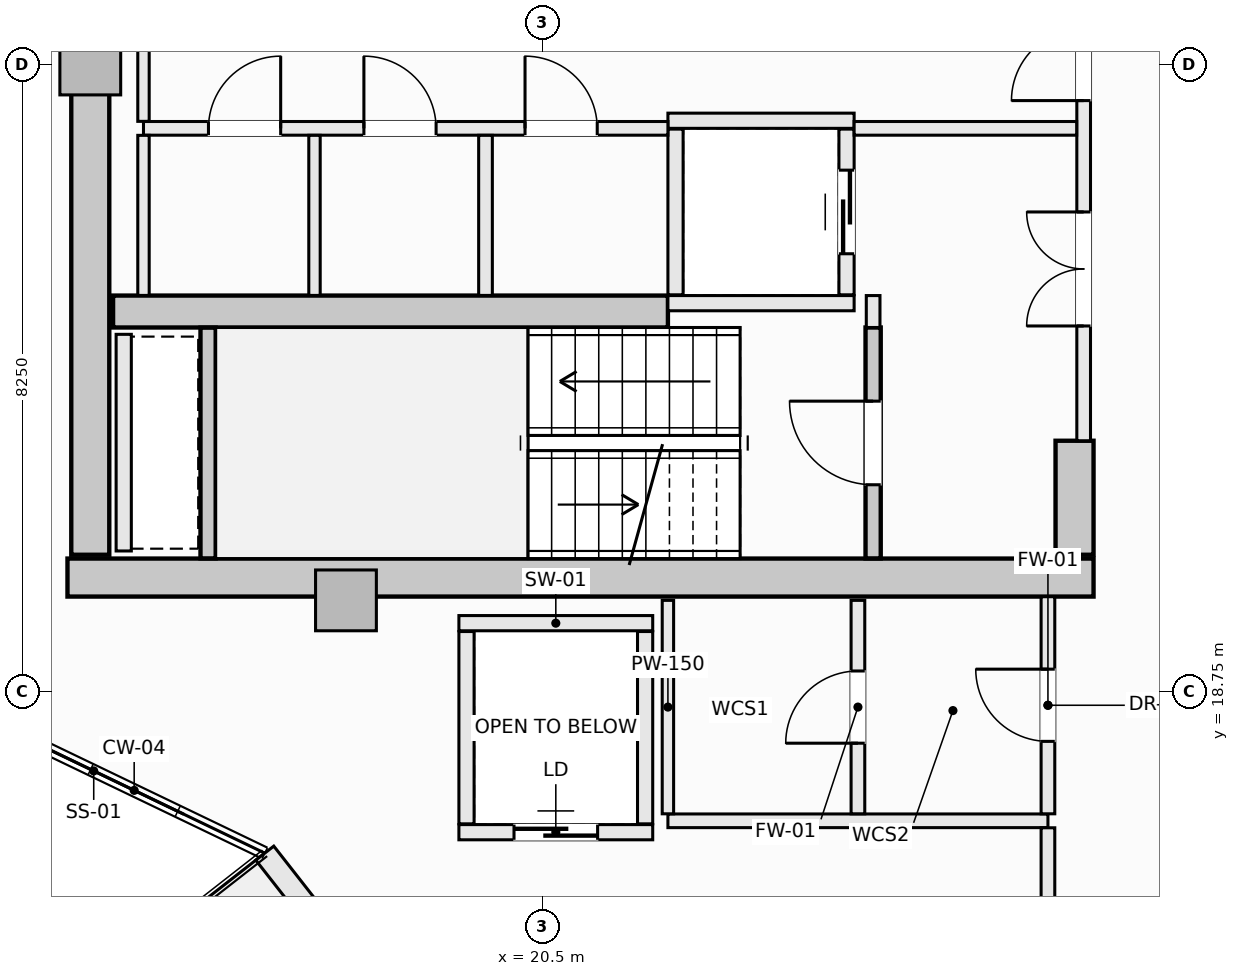
"""IFC4 building model, lengths in metres.
Left out: names, types, materials, properties, quantities, classifications, styles, units other than length and angle.
Written with IfcOpenShell. Run it as: python <this file> out.ifc"""

import sys

from ifc_helpers import new_model, si_unit, direction, frame, frame_2d, origin, origin_2d, place, context, subcontext, project, spatial, rectangle, extrude, element, fill, save


model = new_model("IFC4")
c1 = context("Model", 3, precision=1e-05, world=origin(), true_north=direction((0.0, 1.0)))
c2 = subcontext(c1, "Body", "Model", "MODEL_VIEW")
j1 = project(units=[si_unit("LENGTHUNIT", "METRE"), si_unit("PLANEANGLEUNIT", "RADIAN")], contexts=[c1])
p1 = place(None, origin())
s1 = spatial("IfcSite", under=j1, at=p1, CompositionType="ELEMENT")
p2 = place(p1, origin())
s2 = spatial("IfcBuilding", under=s1, at=p2, CompositionType="ELEMENT")
p3 = place(p2, frame((0.0, 0.0, 259.1)))
s3 = spatial("IfcBuildingStorey", under=s2, at=p3, CompositionType="ELEMENT", Elevation=259.1)
p4 = place(p3, frame((14.25, 20.25, -0.27), z_axis=(0.0, 0.0, 1.0), x_axis=(1.0, 0.0, 0.0)))
e1 = element("IfcWall", 1, at=p4, inside=s3, PredefinedType="SHEAR", context=c2, shape_type="SweptSolid", body=[
    extrude(rectangle(XDim=13.5, YDim=0.5, at=frame_2d((6.75, 0.0))), origin(), (0.0, 0.0, 1.0), 3.3),
])
p5 = place(p3, frame((14.55, 20.55, -0.27), z_axis=(0.0, 0.0, 1.0), x_axis=(0.0, 1.0, 0.0)))
e2 = element("IfcWall", 2, at=p5, inside=s3, PredefinedType="SHEAR", context=c2, shape_type="SweptSolid", body=[
    extrude(rectangle(XDim=12.9, YDim=0.5, at=frame_2d((6.45, 0.0))), origin(), (0.0, 0.0, 1.0), 3.3),
])
p6 = place(p3, frame((27.5, 20.55, -0.27), z_axis=(0.0, 0.0, 1.0), x_axis=(0.0, 1.0, 0.0)))
e3 = element("IfcWall", 3, at=p6, inside=s3, PredefinedType="SHEAR", context=c2, shape_type="SweptSolid", body=[
    extrude(rectangle(XDim=1.5, YDim=0.5, at=frame_2d((0.75, 0.0))), origin(), (0.0, 0.0, 1.0), 3.3),
])
p7 = place(p3, frame((14.85, 23.75, -0.27), z_axis=(0.0, 0.0, 1.0), x_axis=(1.0, 0.0, 0.0)))
e4 = element("IfcWall", 4, at=p7, inside=s3, PredefinedType="SHEAR", context=c2, shape_type="SweptSolid", body=[
    extrude(rectangle(XDim=7.3, YDim=0.42, at=frame_2d((3.65, 0.0))), origin(), (0.0, 0.0, 1.0), 3.3),
])
for number, where, z_axis, x_axis in (
    (5, (14.55, 27.0, -0.27), (0.0, 0.0, 1.0), (1.0, 0.0, 0.0)),
    (6, (17.914, 19.95, -0.27), (0.0, 0.0, 1.0), (1.0, 0.0, 0.0)),
):
    element("IfcColumn", number, at=place(p3, frame(where, z_axis=z_axis, x_axis=x_axis)), inside=s3, PredefinedType="PILASTER", context=c2, shape_type="SweptSolid", body=[
        extrude(rectangle(XDim=0.8, YDim=0.8, at=origin_2d()), origin(), (0.0, 0.0, 1.0), 3.3),
    ])
p8 = place(p3, frame((16.846, 16.625, 0.0), z_axis=(0.0, 0.0, 1.0), x_axis=(0.616413297421, -0.78742278781, 0.0)))
e7 = element("IfcWall", 7, at=p8, inside=s3, PredefinedType="SOLIDWALL", context=c2, shape_type="SweptSolid", body=[
    extrude(rectangle(XDim=4.888, YDim=0.3, at=frame_2d((2.444, 0.0))), origin(), (0.0, 0.0, 1.0), 2.605),
])
p9 = place(p8, frame((1.344, 0.0, 0.72)))
e8 = element("IfcOpeningElement", 8, at=p9, cuts=e7, PredefinedType="OPENING", context=c2, shape_type="SweptSolid", body=[
    extrude(rectangle(XDim=2.2, YDim=1.65, at=frame_2d((1.1, 0.825))), frame((0.0, 0.16, 0.0), z_axis=(0.0, -1.0, 0.0), x_axis=(1.0, 0.0, 0.0)), (0.0, 0.0, 1.0), 0.32),
])
p10 = place(p3, frame((24.85, 20.502, -0.27), z_axis=(0.0, 0.0, 1.0), x_axis=(0.0, 1.0, 0.0)))
e9 = element("IfcWall", 9, at=p10, inside=s3, PredefinedType="SHEAR", context=c2, shape_type="SweptSolid", body=[
    extrude(rectangle(XDim=3.038, YDim=0.2, at=frame_2d((1.519, 0.0))), origin(), (0.0, 0.0, 1.0), 3.3),
])
p11 = place(p10, frame((0.969, 0.0, 0.27)))
e10 = element("IfcOpeningElement", 10, at=p11, cuts=e9, PredefinedType="OPENING", context=c2, shape_type="SweptSolid", body=[
    extrude(rectangle(XDim=1.1, YDim=2.15, at=frame_2d((0.55, 1.075))), frame((0.0, 0.11, 0.0), z_axis=(0.0, -1.0, 0.0), x_axis=(1.0, 0.0, 0.0)), (0.0, 0.0, 1.0), 0.22),
])
p12 = place(p3, frame((16.1, 20.502, -0.27), z_axis=(0.0, 0.0, 1.0), x_axis=(0.0, 1.0, 0.0)))
e11 = element("IfcWall", 11, at=p12, inside=s3, PredefinedType="SHEAR", context=c2, shape_type="SweptSolid", body=[
    extrude(rectangle(XDim=3.036, YDim=0.2, at=frame_2d((1.518, 0.0))), origin(), (0.0, 0.0, 1.0), 3.3),
])
for number, where, z_axis, x_axis in (
    (12, (22.15, 26.26, 0.0), (0.0, 0.0, 1.0), (1.0, 0.0, 0.0)),
    (13, (22.15, 23.86, 0.0), (0.0, 0.0, 1.0), (1.0, 0.0, 0.0)),
):
    element("IfcWall", number, at=place(p3, frame(where, z_axis=z_axis, x_axis=x_axis)), inside=s3, PredefinedType="SOLIDWALL", context=c2, shape_type="SweptSolid", body=[
        extrude(rectangle(XDim=2.45, YDim=0.2, at=frame_2d((1.225, 0.0))), origin(), (0.0, 0.0, 1.0), 3.03),
    ])
p13 = place(p3, frame((22.25, 23.97, 0.0), z_axis=(0.0, 0.0, 1.0), x_axis=(0.0, 1.0, 0.0)))
e14 = element("IfcWall", 14, at=p13, inside=s3, PredefinedType="SOLIDWALL", context=c2, shape_type="SweptSolid", body=[
    extrude(rectangle(XDim=2.18, YDim=0.2, at=frame_2d((1.09, 0.0))), origin(), (0.0, 0.0, 1.0), 3.03),
])
p14 = place(p3, frame((24.5, 23.97, 0.0), z_axis=(0.0, 0.0, 1.0), x_axis=(0.0, 1.0, 0.0)))
e15 = element("IfcWall", 15, at=p14, inside=s3, PredefinedType="SOLIDWALL", context=c2, shape_type="SweptSolid", body=[
    extrude(rectangle(XDim=2.18, YDim=0.2, at=frame_2d((1.09, 0.0))), origin(), (0.0, 0.0, 1.0), 3.03),
])
p15 = place(p14, frame((0.54, 0.0, 0.0)))
e16 = element("IfcOpeningElement", 16, at=p15, cuts=e15, PredefinedType="OPENING", context=c2, shape_type="SweptSolid", body=[
    extrude(rectangle(XDim=1.1, YDim=2.2, at=frame_2d((0.55, 1.1))), frame((0.0, 0.11, 0.0), z_axis=(0.0, -1.0, 0.0), x_axis=(1.0, 0.0, 0.0)), (0.0, 0.0, 1.0), 0.22),
])
p16 = place(p3, frame((19.4, 19.65, 0.0), z_axis=(0.0, 0.0, 1.0), x_axis=(1.0, 0.0, 0.0)))
e17 = element("IfcWall", 17, at=p16, inside=s3, PredefinedType="SOLIDWALL", context=c2, shape_type="SweptSolid", body=[
    extrude(rectangle(XDim=2.55, YDim=0.2, at=frame_2d((1.275, 0.0))), origin(), (0.0, 0.0, 1.0), 3.03),
])
p17 = place(p3, frame((19.4, 16.9, 0.0), z_axis=(0.0, 0.0, 1.0), x_axis=(1.0, 0.0, 0.0)))
e18 = element("IfcWall", 18, at=p17, inside=s3, PredefinedType="SOLIDWALL", context=c2, shape_type="SweptSolid", body=[
    extrude(rectangle(XDim=2.55, YDim=0.2, at=frame_2d((1.275, 0.0))), origin(), (0.0, 0.0, 1.0), 3.03),
])
p18 = place(p17, frame((0.725, 0.0, 0.0)))
e19 = element("IfcOpeningElement", 19, at=p18, cuts=e18, PredefinedType="OPENING", context=c2, shape_type="SweptSolid", body=[
    extrude(rectangle(XDim=1.1, YDim=2.2, at=frame_2d((0.55, 1.1))), frame((0.0, 0.11, 0.0), z_axis=(0.0, -1.0, 0.0), x_axis=(1.0, 0.0, 0.0)), (0.0, 0.0, 1.0), 0.22),
])
for number, where, z_axis, x_axis in (
    (20, (19.5, 17.01, 0.0), (0.0, 0.0, 1.0), (0.0, 1.0, 0.0)),
    (21, (21.85, 17.01, 0.0), (0.0, 0.0, 1.0), (0.0, 1.0, 0.0)),
):
    element("IfcWall", number, at=place(p3, frame(where, z_axis=z_axis, x_axis=x_axis)), inside=s3, PredefinedType="SOLIDWALL", context=c2, shape_type="SweptSolid", body=[
        extrude(rectangle(XDim=2.53, YDim=0.2, at=frame_2d((1.265, 0.0))), origin(), (0.0, 0.0, 1.0), 3.03),
    ])
p19 = place(p3, frame((14.99, 20.6, 0.0), z_axis=(0.0, 0.0, 1.0), x_axis=(0.0, 1.0, 0.0)))
e22 = element("IfcWall", 22, at=p19, inside=s3, PredefinedType="SOLIDWALL", context=c2, shape_type="SweptSolid", body=[
    extrude(rectangle(XDim=2.85, YDim=0.2, at=frame_2d((1.425, 0.0))), origin(), (0.0, 0.0, 1.0), 3.03),
])
p20 = place(p3, frame((24.85, 23.54, 0.0), z_axis=(0.0, 0.0, 1.0), x_axis=(0.0, 1.0, 0.0)))
e23 = element("IfcWall", 23, at=p20, inside=s3, PredefinedType="SOLIDWALL", context=c2, shape_type="SweptSolid", body=[
    extrude(rectangle(XDim=0.42, YDim=0.18, at=frame_2d((0.21, 0.0))), origin(), (0.0, 0.0, 1.0), 3.03),
])
p21 = place(p3, frame((27.62, 22.05, 0.0), z_axis=(0.0, 0.0, 1.0), x_axis=(0.0, 1.0, 0.0)))
e24 = element("IfcWall", 24, at=p21, inside=s3, PredefinedType="SOLIDWALL", context=c2, shape_type="SweptSolid", body=[
    extrude(rectangle(XDim=9.9, YDim=0.18, at=frame_2d((4.95, 0.0))), origin(), (0.0, 0.0, 1.0), 3.03),
])
p22 = place(p21, frame((4.475, 0.0, 0.0)))
e25 = element("IfcOpeningElement", 25, at=p22, cuts=e24, PredefinedType="OPENING", context=c2, shape_type="SweptSolid", body=[
    extrude(rectangle(XDim=0.95, YDim=2.1, at=frame_2d((0.475, 1.05))), frame((0.0, 0.1, 0.0), z_axis=(0.0, -1.0, 0.0), x_axis=(1.0, 0.0, 0.0)), (0.0, 0.0, 1.0), 0.2),
])
p23 = place(p21, frame((6.89, 0.0, 0.0)))
e26 = element("IfcOpeningElement", 26, at=p23, cuts=e24, PredefinedType="OPENING", context=c2, shape_type="SweptSolid", body=[
    extrude(rectangle(XDim=1.5, YDim=2.2, at=frame_2d((0.75, 1.1))), frame((0.0, 0.1, 0.0), z_axis=(0.0, -1.0, 0.0), x_axis=(1.0, 0.0, 0.0)), (0.0, 0.0, 1.0), 0.2),
])
p24 = place(p21, frame((1.51, 0.0, 0.0)))
e27 = element("IfcOpeningElement", 27, at=p24, cuts=e24, PredefinedType="OPENING", context=c2, shape_type="SweptSolid", body=[
    extrude(rectangle(XDim=1.5, YDim=2.2, at=frame_2d((0.75, 1.1))), frame((0.0, 0.1, 0.0), z_axis=(0.0, -1.0, 0.0), x_axis=(1.0, 0.0, 0.0)), (0.0, 0.0, 1.0), 0.2),
])
p25 = place(p3, frame((15.25, 26.16, 0.0), z_axis=(0.0, 0.0, 1.0), x_axis=(1.0, 0.0, 0.0)))
e28 = element("IfcWall", 28, at=p25, inside=s3, PredefinedType="SOLIDWALL", context=c2, shape_type="SweptSolid", body=[
    extrude(rectangle(XDim=6.9, YDim=0.18, at=frame_2d((3.45, 0.0))), origin(), (0.0, 0.0, 1.0), 3.03),
])
p26 = place(p25, frame((5.02, 0.0, 0.0)))
e29 = element("IfcOpeningElement", 29, at=p26, cuts=e28, PredefinedType="OPENING", context=c2, shape_type="SweptSolid", body=[
    extrude(rectangle(XDim=0.95, YDim=2.1, at=frame_2d((0.475, 1.05))), frame((0.0, 0.1, 0.0), z_axis=(0.0, -1.0, 0.0), x_axis=(1.0, 0.0, 0.0)), (0.0, 0.0, 1.0), 0.2),
])
p27 = place(p25, frame((0.855, 0.0, 0.0)))
e30 = element("IfcOpeningElement", 30, at=p27, cuts=e28, PredefinedType="OPENING", context=c2, shape_type="SweptSolid", body=[
    extrude(rectangle(XDim=0.95, YDim=2.1, at=frame_2d((0.475, 1.05))), frame((0.0, 0.1, 0.0), z_axis=(0.0, -1.0, 0.0), x_axis=(1.0, 0.0, 0.0)), (0.0, 0.0, 1.0), 0.2),
])
p28 = place(p25, frame((2.9, 0.0, 0.0)))
e31 = element("IfcOpeningElement", 31, at=p28, cuts=e28, PredefinedType="OPENING", context=c2, shape_type="SweptSolid", body=[
    extrude(rectangle(XDim=0.95, YDim=2.1, at=frame_2d((0.475, 1.05))), frame((0.0, 0.1, 0.0), z_axis=(0.0, -1.0, 0.0), x_axis=(1.0, 0.0, 0.0)), (0.0, 0.0, 1.0), 0.2),
])
p29 = place(p3, frame((24.6, 26.16, 0.0), z_axis=(0.0, 0.0, 1.0), x_axis=(1.0, 0.0, 0.0)))
e32 = element("IfcWall", 32, at=p29, inside=s3, PredefinedType="SOLIDWALL", context=c2, shape_type="SweptSolid", body=[
    extrude(rectangle(XDim=2.928, YDim=0.18, at=frame_2d((1.464, 0.0))), origin(), (0.0, 0.0, 1.0), 3.03),
])
p30 = place(p3, frame((15.25, 23.962, 0.0), z_axis=(0.0, 0.0, 1.0), x_axis=(0.0, 1.0, 0.0)))
e33 = element("IfcWall", 33, at=p30, inside=s3, PredefinedType="PARTITIONING", context=c2, shape_type="SweptSolid", body=[
    extrude(rectangle(XDim=2.106, YDim=0.15, at=frame_2d((1.053, 0.0))), origin(), (0.0, 0.0, 1.0), 3.03),
])
p31 = place(p3, frame((15.25, 26.252, 0.0), z_axis=(0.0, 0.0, 1.0), x_axis=(0.0, 1.0, 0.0)))
e34 = element("IfcWall", 34, at=p31, inside=s3, PredefinedType="PARTITIONING", context=c2, shape_type="SweptSolid", body=[
    extrude(rectangle(XDim=1.496, YDim=0.15, at=frame_2d((0.748, 0.0))), origin(), (0.0, 0.0, 1.0), 3.03),
])
p32 = place(p3, frame((19.75, 23.962, 0.0), z_axis=(0.0, 0.0, 1.0), x_axis=(0.0, 1.0, 0.0)))
e35 = element("IfcWall", 35, at=p32, inside=s3, PredefinedType="SOLIDWALL", context=c2, shape_type="SweptSolid", body=[
    extrude(rectangle(XDim=2.106, YDim=0.18, at=frame_2d((1.053, 0.0))), origin(), (0.0, 0.0, 1.0), 3.03),
])
p33 = place(p3, frame((17.5, 23.962, 0.0), z_axis=(0.0, 0.0, 1.0), x_axis=(0.0, 1.0, 0.0)))
e36 = element("IfcWall", 36, at=p33, inside=s3, PredefinedType="PARTITIONING", context=c2, shape_type="SweptSolid", body=[
    extrude(rectangle(XDim=2.106, YDim=0.15, at=frame_2d((1.053, 0.0))), origin(), (0.0, 0.0, 1.0), 3.03),
])
p34 = place(p3, frame((22.15, 17.05, 0.0), z_axis=(0.0, 0.0, 1.0), x_axis=(1.0, 0.0, 0.0)))
e37 = element("IfcWall", 37, at=p34, inside=s3, PredefinedType="SOLIDWALL", context=c2, shape_type="SweptSolid", body=[
    extrude(rectangle(XDim=5.0, YDim=0.18, at=frame_2d((2.5, 0.0))), origin(), (0.0, 0.0, 1.0), 3.03),
])
p35 = place(p3, frame((22.15, 17.142, 0.0), z_axis=(0.0, 0.0, 1.0), x_axis=(0.0, 1.0, 0.0)))
e38 = element("IfcWall", 38, at=p35, inside=s3, PredefinedType="PARTITIONING", context=c2, shape_type="SweptSolid", body=[
    extrude(rectangle(XDim=2.808, YDim=0.15, at=frame_2d((1.404, 0.0))), origin(), (0.0, 0.0, 1.0), 3.03),
])
p36 = place(p3, frame((24.65, 17.142, 0.0), z_axis=(0.0, 0.0, 1.0), x_axis=(0.0, 1.0, 0.0)))
e39 = element("IfcWall", 39, at=p36, inside=s3, PredefinedType="SOLIDWALL", context=c2, shape_type="SweptSolid", body=[
    extrude(rectangle(XDim=2.808, YDim=0.18, at=frame_2d((1.404, 0.0))), origin(), (0.0, 0.0, 1.0), 3.03),
])
p37 = place(p36, frame((0.929, 0.0, 0.0)))
e40 = element("IfcOpeningElement", 40, at=p37, cuts=e39, PredefinedType="OPENING", context=c2, shape_type="SweptSolid", body=[
    extrude(rectangle(XDim=0.95, YDim=2.1, at=frame_2d((0.475, 1.05))), frame((0.0, 0.1, 0.0), z_axis=(0.0, -1.0, 0.0), x_axis=(1.0, 0.0, 0.0)), (0.0, 0.0, 1.0), 0.2),
])
p38 = place(p3, frame((27.15, 13.181, 0.0), z_axis=(0.0, 0.0, 1.0), x_axis=(0.0, 1.0, 0.0)))
e41 = element("IfcWall", 41, at=p38, inside=s3, PredefinedType="SOLIDWALL", context=c2, shape_type="SweptSolid", body=[
    extrude(rectangle(XDim=3.777, YDim=0.18, at=frame_2d((1.889, 0.0))), origin(), (0.0, 0.0, 1.0), 3.03),
])
p39 = place(p38, frame((1.414, 0.0, 0.0)))
e42 = element("IfcOpeningElement", 42, at=p39, cuts=e41, PredefinedType="OPENING", context=c2, shape_type="SweptSolid", body=[
    extrude(rectangle(XDim=0.95, YDim=2.1, at=frame_2d((0.475, 1.05))), frame((0.0, 0.1, 0.0), z_axis=(0.0, -1.0, 0.0), x_axis=(1.0, 0.0, 0.0)), (0.0, 0.0, 1.0), 0.2),
])
p40 = place(p3, frame((27.15, 17.142, 0.0), z_axis=(0.0, 0.0, 1.0), x_axis=(0.0, 1.0, 0.0)))
e43 = element("IfcWall", 43, at=p40, inside=s3, PredefinedType="SOLIDWALL", context=c2, shape_type="SweptSolid", body=[
    extrude(rectangle(XDim=2.856, YDim=0.18, at=frame_2d((1.428, 0.0))), origin(), (0.0, 0.0, 1.0), 3.03),
])
p41 = place(p40, frame((0.953, 0.0, 0.0)))
e44 = element("IfcOpeningElement", 44, at=p41, cuts=e43, PredefinedType="OPENING", context=c2, shape_type="SweptSolid", body=[
    extrude(rectangle(XDim=0.95, YDim=2.1, at=frame_2d((0.475, 1.05))), frame((0.0, 0.1, 0.0), z_axis=(0.0, -1.0, 0.0), x_axis=(1.0, 0.0, 0.0)), (0.0, 0.0, 1.0), 0.2),
])
p42 = place(p11, origin())
e45 = element("IfcDoor", 45, at=p42, inside=s3, OperationType="SINGLE_SWING_RIGHT", PredefinedType="DOOR", context=c2, shape_type="SweptSolid", body=[
    extrude(rectangle(XDim=1.1, YDim=2.15, at=frame_2d((0.55, 1.075))), frame((0.0, 0.025, 0.0), z_axis=(0.0, -1.0, 0.0), x_axis=(1.0, 0.0, 0.0)), (0.0, 0.0, 1.0), 0.05),
])
fill(e10, e45)
p43 = place(p15, origin())
e46 = element("IfcDoor", 46, at=p43, inside=s3, OperationType="SLIDING_TO_LEFT", PredefinedType="DOOR", context=c2, shape_type="SweptSolid", body=[
    extrude(rectangle(XDim=1.1, YDim=2.2, at=frame_2d((0.55, 1.1))), frame((0.0, 0.025, 0.0), z_axis=(0.0, -1.0, 0.0), x_axis=(1.0, 0.0, 0.0)), (0.0, 0.0, 1.0), 0.05),
])
fill(e16, e46)
p44 = place(p18, origin())
e47 = element("IfcDoor", 47, at=p44, inside=s3, OperationType="SLIDING_TO_LEFT", PredefinedType="DOOR", context=c2, shape_type="SweptSolid", body=[
    extrude(rectangle(XDim=1.1, YDim=2.2, at=frame_2d((0.55, 1.1))), frame((0.0, 0.025, 0.0), z_axis=(0.0, -1.0, 0.0), x_axis=(1.0, 0.0, 0.0)), (0.0, 0.0, 1.0), 0.05),
])
fill(e19, e47)
p45 = place(p22, origin())
e48 = element("IfcDoor", 48, at=p45, inside=s3, OperationType="SINGLE_SWING_LEFT", PredefinedType="DOOR", context=c2, shape_type="SweptSolid", body=[
    extrude(rectangle(XDim=0.95, YDim=2.1, at=frame_2d((0.475, 1.05))), frame((0.0, 0.025, 0.0), z_axis=(0.0, -1.0, 0.0), x_axis=(1.0, 0.0, 0.0)), (0.0, 0.0, 1.0), 0.05),
])
fill(e25, e48)
p46 = place(p24, origin())
e49 = element("IfcDoor", 49, at=p46, inside=s3, OperationType="DOUBLE_DOOR_SINGLE_SWING", PredefinedType="DOOR", context=c2, shape_type="SweptSolid", body=[
    extrude(rectangle(XDim=1.5, YDim=2.2, at=frame_2d((0.75, 1.1))), frame((0.0, 0.025, 0.0), z_axis=(0.0, -1.0, 0.0), x_axis=(1.0, 0.0, 0.0)), (0.0, 0.0, 1.0), 0.05),
])
fill(e27, e49)
p47 = place(p26, origin())
e50 = element("IfcDoor", 50, at=p47, inside=s3, OperationType="SINGLE_SWING_LEFT", PredefinedType="DOOR", context=c2, shape_type="SweptSolid", body=[
    extrude(rectangle(XDim=0.95, YDim=2.1, at=frame_2d((0.475, 1.05))), frame((0.0, 0.025, 0.0), z_axis=(0.0, -1.0, 0.0), x_axis=(1.0, 0.0, 0.0)), (0.0, 0.0, 1.0), 0.05),
])
fill(e29, e50)
p48 = place(p27, origin())
e51 = element("IfcDoor", 51, at=p48, inside=s3, OperationType="SINGLE_SWING_RIGHT", PredefinedType="DOOR", context=c2, shape_type="SweptSolid", body=[
    extrude(rectangle(XDim=0.95, YDim=2.1, at=frame_2d((0.475, 1.05))), frame((0.0, 0.025, 0.0), z_axis=(0.0, -1.0, 0.0), x_axis=(1.0, 0.0, 0.0)), (0.0, 0.0, 1.0), 0.05),
])
fill(e30, e51)
p49 = place(p28, origin())
e52 = element("IfcDoor", 52, at=p49, inside=s3, OperationType="SINGLE_SWING_LEFT", PredefinedType="DOOR", context=c2, shape_type="SweptSolid", body=[
    extrude(rectangle(XDim=0.95, YDim=2.1, at=frame_2d((0.475, 1.05))), frame((0.0, 0.025, 0.0), z_axis=(0.0, -1.0, 0.0), x_axis=(1.0, 0.0, 0.0)), (0.0, 0.0, 1.0), 0.05),
])
fill(e31, e52)
p50 = place(p41, origin())
e53 = element("IfcDoor", 53, at=p50, inside=s3, OperationType="SINGLE_SWING_RIGHT", PredefinedType="DOOR", context=c2, shape_type="SweptSolid", body=[
    extrude(rectangle(XDim=0.95, YDim=2.1, at=frame_2d((0.475, 1.05))), frame((0.0, 0.025, 0.0), z_axis=(0.0, -1.0, 0.0), x_axis=(1.0, 0.0, 0.0)), (0.0, 0.0, 1.0), 0.05),
])
fill(e44, e53)
p51 = place(p37, origin())
e54 = element("IfcDoor", 54, at=p51, inside=s3, OperationType="SINGLE_SWING_LEFT", PredefinedType="DOOR", context=c2, shape_type="SweptSolid", body=[
    extrude(rectangle(XDim=0.95, YDim=2.1, at=frame_2d((0.475, 1.05))), frame((0.0, 0.025, 0.0), z_axis=(0.0, -1.0, 0.0), x_axis=(1.0, 0.0, 0.0)), (0.0, 0.0, 1.0), 0.05),
])
fill(e40, e54)
save(model, sys.argv[1])
